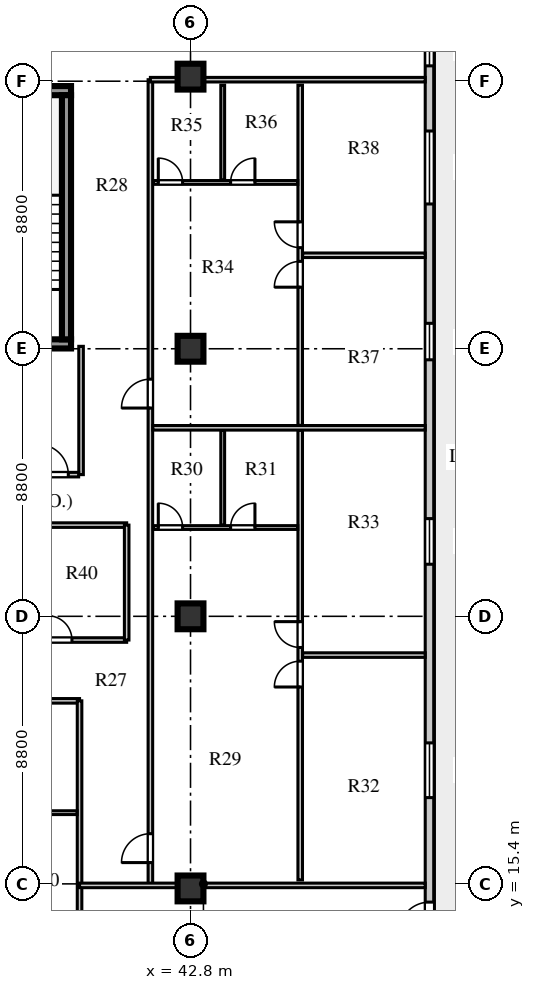
"""IFC4 building model, lengths in metres.
Left out: names, types, materials, properties, quantities, classifications, styles, units other than length and angle.
Written with IfcOpenShell. Run it as: python <this file> out.ifc"""

import sys

from ifc_helpers import new_model, si_unit, direction, frame, frame_2d, origin, origin_2d, place, context, subcontext, project, spatial, rectangle, extrude, element, fill, save


model = new_model("IFC4")
c1 = context("Model", 3, precision=1e-05, world=origin(), true_north=direction((0.0, 1.0)))
c2 = subcontext(c1, "Body", "Model", "MODEL_VIEW")
j1 = project(units=[si_unit("LENGTHUNIT", "METRE"), si_unit("PLANEANGLEUNIT", "RADIAN")], contexts=[c1])
p1 = place(None, origin())
s1 = spatial("IfcSite", under=j1, at=p1, CompositionType="ELEMENT")
p2 = place(p1, origin())
s2 = spatial("IfcBuilding", under=s1, at=p2, CompositionType="ELEMENT")
p3 = place(p2, frame((0.0, 0.0, 245.3)))
s3 = spatial("IfcBuildingStorey", under=s2, at=p3, CompositionType="ELEMENT", Elevation=245.3)
for number, where, z_axis, x_axis in (
    (1, (34.225, 33.16, 0.0), (0.0, 0.0, 1.0), (1.0, 0.0, 0.0)),
    (2, (34.225, 41.49, 0.0), (0.0, 0.0, 1.0), (1.0, 0.0, 0.0)),
):
    element("IfcWall", number, at=place(p3, frame(where, z_axis=z_axis, x_axis=x_axis)), inside=s3, PredefinedType="SHEAR", context=c2, shape_type="SweptSolid", body=[
        extrude(rectangle(XDim=4.645, YDim=0.3, at=frame_2d((2.323, 0.0))), origin(), (0.0, 0.0, 1.0), 3.66),
    ])
p4 = place(p3, frame((38.72, 33.31, 0.0), z_axis=(0.0, 0.0, 1.0), x_axis=(0.0, 1.0, 0.0)))
e3 = element("IfcWall", 3, at=p4, inside=s3, PredefinedType="SHEAR", context=c2, shape_type="SweptSolid", body=[
    extrude(rectangle(XDim=8.03, YDim=0.3, at=frame_2d((4.015, 0.0))), origin(), (0.0, 0.0, 1.0), 3.66),
])
for number, where, z_axis, x_axis in (
    (4, (42.8, 15.25, 0.0), (0.0, 0.0, 1.0), (1.0, 0.0, 0.0)),
    (5, (42.8, 24.2, 0.0), (0.0, 0.0, 1.0), (1.0, 0.0, 0.0)),
    (6, (42.8, 33.0, 0.0), (0.0, 0.0, 1.0), (1.0, 0.0, 0.0)),
    (7, (42.8, 41.95, 0.0), (0.0, 0.0, 1.0), (1.0, 0.0, 0.0)),
):
    element("IfcColumn", number, at=place(p3, frame(where, z_axis=z_axis, x_axis=x_axis)), inside=s3, PredefinedType="COLUMN", context=c2, shape_type="SweptSolid", body=[
        extrude(rectangle(XDim=0.85, YDim=0.85, at=origin_2d()), origin(), (0.0, 0.0, 1.0), 3.66),
    ])
p5 = place(p3, frame((50.66, 13.13, 0.0), z_axis=(0.0, 0.0, 1.0), x_axis=(0.0, 1.0, 0.0)))
e8 = element("IfcWall", 8, at=p5, inside=s3, PredefinedType="STANDARD", context=c2, shape_type="SweptSolid", body=[
    extrude(rectangle(XDim=30.94, YDim=0.28, at=frame_2d((15.47, 0.0))), origin(), (0.0, 0.0, 1.0), 3.66),
])
p6 = place(p5, frame((0.67, 0.0, 0.0)))
e9 = element("IfcOpeningElement", 9, at=p6, cuts=e8, PredefinedType="OPENING", context=c2, shape_type="SweptSolid", body=[
    extrude(rectangle(XDim=1.0, YDim=2.05, at=frame_2d((0.5, 1.025))), frame((0.0, 0.15, 0.0), z_axis=(0.0, -1.0, 0.0), x_axis=(1.0, 0.0, 0.0)), (0.0, 0.0, 1.0), 0.3),
])
p7 = place(p5, frame((5.107, 0.0, 0.8)))
e10 = element("IfcOpeningElement", 10, at=p7, cuts=e8, PredefinedType="OPENING", context=c2, shape_type="SweptSolid", body=[
    extrude(rectangle(XDim=1.8, YDim=2.0, at=frame_2d((0.9, 1.0))), frame((0.0, 0.15, 0.0), z_axis=(0.0, -1.0, 0.0), x_axis=(1.0, 0.0, 0.0)), (0.0, 0.0, 1.0), 0.3),
])
p8 = place(p5, frame((12.783, 0.0, 0.8)))
e11 = element("IfcOpeningElement", 11, at=p8, cuts=e8, PredefinedType="OPENING", context=c2, shape_type="SweptSolid", body=[
    extrude(rectangle(XDim=1.5, YDim=2.0, at=frame_2d((0.75, 1.0))), frame((0.0, 0.15, 0.0), z_axis=(0.0, -1.0, 0.0), x_axis=(1.0, 0.0, 0.0)), (0.0, 0.0, 1.0), 0.3),
])
p9 = place(p5, frame((19.507, 0.0, 0.8)))
e12 = element("IfcOpeningElement", 12, at=p9, cuts=e8, PredefinedType="OPENING", context=c2, shape_type="SweptSolid", body=[
    extrude(rectangle(XDim=1.2, YDim=1.75, at=frame_2d((0.6, 0.875))), frame((0.0, 0.15, 0.0), z_axis=(0.0, -1.0, 0.0), x_axis=(1.0, 0.0, 0.0)), (0.0, 0.0, 1.0), 0.3),
])
p10 = place(p5, frame((24.632, 0.0, 0.8)))
e13 = element("IfcOpeningElement", 13, at=p10, cuts=e8, PredefinedType="OPENING", context=c2, shape_type="SweptSolid", body=[
    extrude(rectangle(XDim=2.4, YDim=2.05, at=frame_2d((1.2, 1.025))), frame((0.0, 0.15, 0.0), z_axis=(0.0, -1.0, 0.0), x_axis=(1.0, 0.0, 0.0)), (0.0, 0.0, 1.0), 0.3),
])
p11 = place(p5, frame((29.175, 0.0, 0.8)))
e14 = element("IfcOpeningElement", 14, at=p11, cuts=e8, PredefinedType="OPENING", context=c2, shape_type="SweptSolid", body=[
    extrude(rectangle(XDim=1.2, YDim=1.75, at=frame_2d((0.6, 0.875))), frame((0.0, 0.15, 0.0), z_axis=(0.0, -1.0, 0.0), x_axis=(1.0, 0.0, 0.0)), (0.0, 0.0, 1.0), 0.3),
])
p12 = place(p3, frame((39.2, 28.86, 0.0), z_axis=(0.0, 0.0, 1.0), x_axis=(0.0, 1.0, 0.0)))
e15 = element("IfcWall", 15, at=p12, inside=s3, PredefinedType="PARTITIONING", context=c2, shape_type="SweptSolid", body=[
    extrude(rectangle(XDim=4.22, YDim=0.15, at=frame_2d((2.11, 0.0))), origin(), (0.0, 0.0, 1.0), 3.66),
])
p13 = place(p3, frame((37.48, 28.86, 0.0), z_axis=(0.0, 0.0, 1.0), x_axis=(1.0, 0.0, 0.0)))
e16 = element("IfcWall", 16, at=p13, inside=s3, PredefinedType="PARTITIONING", context=c2, shape_type="SweptSolid", body=[
    extrude(rectangle(XDim=1.64, YDim=0.15, at=frame_2d((0.82, 0.0))), origin(), (0.0, 0.0, 1.0), 3.66),
])
p14 = place(p13, frame((0.3, 0.0, 0.0)))
e17 = element("IfcOpeningElement", 17, at=p14, cuts=e16, PredefinedType="OPENING", context=c2, shape_type="SweptSolid", body=[
    extrude(rectangle(XDim=1.0, YDim=2.1, at=frame_2d((0.5, 1.05))), frame((0.0, 0.085, 0.0), z_axis=(0.0, -1.0, 0.0), x_axis=(1.0, 0.0, 0.0)), (0.0, 0.0, 1.0), 0.17),
])
p15 = place(p3, frame((27.08, 21.42, 0.0), z_axis=(0.0, 0.0, 1.0), x_axis=(1.0, 0.0, 0.0)))
e18 = element("IfcWall", 18, at=p15, inside=s3, PredefinedType="PARTITIONING", context=c2, shape_type="SweptSolid", body=[
    extrude(rectangle(XDim=12.07, YDim=0.15, at=frame_2d((6.035, 0.0))), origin(), (0.0, 0.0, 1.0), 3.31),
])
p16 = place(p15, frame((0.63, 0.0, 0.0)))
e19 = element("IfcOpeningElement", 19, at=p16, cuts=e18, PredefinedType="OPENING", context=c2, shape_type="SweptSolid", body=[
    extrude(rectangle(XDim=0.95, YDim=2.1, at=frame_2d((0.475, 1.05))), frame((0.0, 0.085, 0.0), z_axis=(0.0, -1.0, 0.0), x_axis=(1.0, 0.0, 0.0)), (0.0, 0.0, 1.0), 0.17),
])
p17 = place(p3, frame((39.15, 7.88, 0.0), z_axis=(0.0, 0.0, 1.0), x_axis=(0.0, 1.0, 0.0)))
e20 = element("IfcWall", 20, at=p17, inside=s3, PredefinedType="PARTITIONING", context=c2, shape_type="SweptSolid", body=[
    extrude(rectangle(XDim=13.54, YDim=0.15, at=frame_2d((6.77, 0.0))), origin(), (0.0, 0.0, 1.0), 3.66),
])
p18 = place(p3, frame((35.85, 17.742, 0.0), z_axis=(0.0, 0.0, 1.0), x_axis=(1.0, 0.0, 0.0)))
e21 = element("IfcWall", 21, at=p18, inside=s3, PredefinedType="PLUMBINGWALL", context=c2, shape_type="SweptSolid", body=[
    extrude(rectangle(XDim=3.22, YDim=0.125, at=frame_2d((1.61, 0.0))), origin(), (0.0, 0.0, 1.0), 3.66),
])
p19 = place(p3, frame((41.48, 15.35, 0.0), z_axis=(0.0, 0.0, 1.0), x_axis=(0.0, 1.0, 0.0)))
e22 = element("IfcWall", 22, at=p19, inside=s3, PredefinedType="PARTITIONING", context=c2, shape_type="SweptSolid", body=[
    extrude(rectangle(XDim=26.5, YDim=0.15, at=frame_2d((13.25, 0.0))), origin(), (0.0, 0.0, 1.0), 3.66),
])
p20 = place(p19, frame((0.75, 0.0, 0.0)))
e23 = element("IfcOpeningElement", 23, at=p20, cuts=e22, PredefinedType="OPENING", context=c2, shape_type="SweptSolid", body=[
    extrude(rectangle(XDim=0.95, YDim=2.1, at=frame_2d((0.475, 1.05))), frame((0.0, 0.085, 0.0), z_axis=(0.0, -1.0, 0.0), x_axis=(1.0, 0.0, 0.0)), (0.0, 0.0, 1.0), 0.17),
])
p21 = place(p19, frame((15.7, 0.0, 0.0)))
e24 = element("IfcOpeningElement", 24, at=p21, cuts=e22, PredefinedType="OPENING", context=c2, shape_type="SweptSolid", body=[
    extrude(rectangle(XDim=0.95, YDim=2.1, at=frame_2d((0.475, 1.05))), frame((0.0, 0.085, 0.0), z_axis=(0.0, -1.0, 0.0), x_axis=(1.0, 0.0, 0.0)), (0.0, 0.0, 1.0), 0.17),
])
p22 = place(p3, frame((39.15, 15.35, 0.0), z_axis=(0.0, 0.0, 1.0), x_axis=(1.0, 0.0, 0.0)))
e25 = element("IfcWall", 25, at=p22, inside=s3, PredefinedType="PARTITIONING", context=c2, shape_type="SweptSolid", body=[
    extrude(rectangle(XDim=11.37, YDim=0.15, at=frame_2d((5.685, 0.0))), origin(), (0.0, 0.0, 1.0), 3.06),
])
p23 = place(p3, frame((41.48, 41.85, 0.0), z_axis=(0.0, 0.0, 1.0), x_axis=(1.0, 0.0, 0.0)))
e26 = element("IfcWall", 26, at=p23, inside=s3, PredefinedType="PARTITIONING", context=c2, shape_type="SweptSolid", body=[
    extrude(rectangle(XDim=9.04, YDim=0.15, at=frame_2d((4.52, 0.0))), origin(), (0.0, 0.0, 1.0), 3.06),
])
p24 = place(p3, frame((46.408, 15.53, 0.0), z_axis=(0.0, 0.0, 1.0), x_axis=(0.0, 1.0, 0.0)))
e27 = element("IfcWall", 27, at=p24, inside=s3, PredefinedType="PARTITIONING", context=c2, shape_type="SweptSolid", body=[
    extrude(rectangle(XDim=14.79, YDim=0.15, at=frame_2d((7.395, 0.0))), origin(), (0.0, 0.0, 1.0), 3.66),
])
p25 = place(p24, frame((6.345, 0.0, 0.0)))
e28 = element("IfcOpeningElement", 28, at=p25, cuts=e27, PredefinedType="OPENING", context=c2, shape_type="SweptSolid", body=[
    extrude(rectangle(XDim=0.85, YDim=2.08, at=frame_2d((0.425, 1.04))), frame((0.0, 0.085, 0.0), z_axis=(0.0, -1.0, 0.0), x_axis=(1.0, 0.0, 0.0)), (0.0, 0.0, 1.0), 0.17),
])
p26 = place(p24, frame((7.645, 0.0, 0.0)))
e29 = element("IfcOpeningElement", 29, at=p26, cuts=e27, PredefinedType="OPENING", context=c2, shape_type="SweptSolid", body=[
    extrude(rectangle(XDim=0.85, YDim=2.08, at=frame_2d((0.425, 1.04))), frame((0.0, 0.085, 0.0), z_axis=(0.0, -1.0, 0.0), x_axis=(1.0, 0.0, 0.0)), (0.0, 0.0, 1.0), 0.17),
])
p27 = place(p3, frame((41.58, 27.12, 0.0), z_axis=(0.0, 0.0, 1.0), x_axis=(1.0, 0.0, 0.0)))
e30 = element("IfcWall", 30, at=p27, inside=s3, PredefinedType="PLUMBINGWALL", context=c2, shape_type="SweptSolid", body=[
    extrude(rectangle(XDim=4.748, YDim=0.125, at=frame_2d((2.374, 0.0))), origin(), (0.0, 0.0, 1.0), 3.31),
])
p28 = place(p27, frame((0.16, 0.0, 0.0)))
e31 = element("IfcOpeningElement", 31, at=p28, cuts=e30, PredefinedType="OPENING", context=c2, shape_type="SweptSolid", body=[
    extrude(rectangle(XDim=0.8, YDim=2.05, at=frame_2d((0.4, 1.025))), frame((0.0, 0.073, 0.0), z_axis=(0.0, -1.0, 0.0), x_axis=(1.0, 0.0, 0.0)), (0.0, 0.0, 1.0), 0.145),
])
p29 = place(p27, frame((2.539, 0.0, 0.0)))
e32 = element("IfcOpeningElement", 32, at=p29, cuts=e30, PredefinedType="OPENING", context=c2, shape_type="SweptSolid", body=[
    extrude(rectangle(XDim=0.8, YDim=2.05, at=frame_2d((0.4, 1.025))), frame((0.0, 0.073, 0.0), z_axis=(0.0, -1.0, 0.0), x_axis=(1.0, 0.0, 0.0)), (0.0, 0.0, 1.0), 0.145),
])
p30 = place(p3, frame((43.859, 27.2, 0.0), z_axis=(0.0, 0.0, 1.0), x_axis=(0.0, 1.0, 0.0)))
e33 = element("IfcWall", 33, at=p30, inside=s3, PredefinedType="PLUMBINGWALL", context=c2, shape_type="SweptSolid", body=[
    extrude(rectangle(XDim=3.12, YDim=0.125, at=frame_2d((1.56, 0.0))), origin(), (0.0, 0.0, 1.0), 3.66),
])
p31 = place(p3, frame((46.488, 22.925, 0.0), z_axis=(0.0, 0.0, 1.0), x_axis=(1.0, 0.0, 0.0)))
e34 = element("IfcWall", 34, at=p31, inside=s3, PredefinedType="PARTITIONING", context=c2, shape_type="SweptSolid", body=[
    extrude(rectangle(XDim=4.032, YDim=0.15, at=frame_2d((2.016, 0.0))), origin(), (0.0, 0.0, 1.0), 3.66),
])
p32 = place(p3, frame((41.56, 30.4, 0.0), z_axis=(0.0, 0.0, 1.0), x_axis=(1.0, 0.0, 0.0)))
e35 = element("IfcWall", 35, at=p32, inside=s3, PredefinedType="PARTITIONING", context=c2, shape_type="SweptSolid", body=[
    extrude(rectangle(XDim=8.96, YDim=0.15, at=frame_2d((4.48, 0.0))), origin(), (0.0, 0.0, 1.0), 3.66),
])
p33 = place(p3, frame((46.408, 30.48, 0.0), z_axis=(0.0, 0.0, 1.0), x_axis=(0.0, 1.0, 0.0)))
e36 = element("IfcWall", 36, at=p33, inside=s3, PredefinedType="PARTITIONING", context=c2, shape_type="SweptSolid", body=[
    extrude(rectangle(XDim=11.19, YDim=0.15, at=frame_2d((5.595, 0.0))), origin(), (0.0, 0.0, 1.0), 3.66),
])
p34 = place(p33, frame((4.545, 0.0, 0.0)))
e37 = element("IfcOpeningElement", 37, at=p34, cuts=e36, PredefinedType="OPENING", context=c2, shape_type="SweptSolid", body=[
    extrude(rectangle(XDim=0.85, YDim=2.08, at=frame_2d((0.425, 1.04))), frame((0.0, 0.085, 0.0), z_axis=(0.0, -1.0, 0.0), x_axis=(1.0, 0.0, 0.0)), (0.0, 0.0, 1.0), 0.17),
])
p35 = place(p33, frame((5.845, 0.0, 0.0)))
e38 = element("IfcOpeningElement", 38, at=p35, cuts=e36, PredefinedType="OPENING", context=c2, shape_type="SweptSolid", body=[
    extrude(rectangle(XDim=0.85, YDim=2.08, at=frame_2d((0.425, 1.04))), frame((0.0, 0.085, 0.0), z_axis=(0.0, -1.0, 0.0), x_axis=(1.0, 0.0, 0.0)), (0.0, 0.0, 1.0), 0.17),
])
p36 = place(p3, frame((41.58, 38.47, 0.0), z_axis=(0.0, 0.0, 1.0), x_axis=(1.0, 0.0, 0.0)))
e39 = element("IfcWall", 39, at=p36, inside=s3, PredefinedType="PLUMBINGWALL", context=c2, shape_type="SweptSolid", body=[
    extrude(rectangle(XDim=4.748, YDim=0.125, at=frame_2d((2.374, 0.0))), origin(), (0.0, 0.0, 1.0), 3.66),
])
p37 = place(p36, frame((0.16, 0.0, 0.0)))
e40 = element("IfcOpeningElement", 40, at=p37, cuts=e39, PredefinedType="OPENING", context=c2, shape_type="SweptSolid", body=[
    extrude(rectangle(XDim=0.8, YDim=2.05, at=frame_2d((0.4, 1.025))), frame((0.0, 0.073, 0.0), z_axis=(0.0, -1.0, 0.0), x_axis=(1.0, 0.0, 0.0)), (0.0, 0.0, 1.0), 0.145),
])
p38 = place(p36, frame((2.539, 0.0, 0.0)))
e41 = element("IfcOpeningElement", 41, at=p38, cuts=e39, PredefinedType="OPENING", context=c2, shape_type="SweptSolid", body=[
    extrude(rectangle(XDim=0.8, YDim=2.05, at=frame_2d((0.4, 1.025))), frame((0.0, 0.073, 0.0), z_axis=(0.0, -1.0, 0.0), x_axis=(1.0, 0.0, 0.0)), (0.0, 0.0, 1.0), 0.145),
])
p39 = place(p3, frame((43.859, 38.55, 0.0), z_axis=(0.0, 0.0, 1.0), x_axis=(0.0, 1.0, 0.0)))
e42 = element("IfcWall", 42, at=p39, inside=s3, PredefinedType="PLUMBINGWALL", context=c2, shape_type="SweptSolid", body=[
    extrude(rectangle(XDim=3.12, YDim=0.125, at=frame_2d((1.56, 0.0))), origin(), (0.0, 0.0, 1.0), 3.66),
])
p40 = place(p3, frame((46.488, 36.075, 0.0), z_axis=(0.0, 0.0, 1.0), x_axis=(1.0, 0.0, 0.0)))
e43 = element("IfcWall", 43, at=p40, inside=s3, PredefinedType="PARTITIONING", context=c2, shape_type="SweptSolid", body=[
    extrude(rectangle(XDim=4.032, YDim=0.15, at=frame_2d((2.016, 0.0))), origin(), (0.0, 0.0, 1.0), 3.66),
])
p41 = place(p3, frame((34.8, 23.42, 0.0), z_axis=(0.0, 0.0, 1.0), x_axis=(1.0, 0.0, 0.0)))
e44 = element("IfcWall", 44, at=p41, inside=s3, PredefinedType="PARTITIONING", context=c2, shape_type="SweptSolid", body=[
    extrude(rectangle(XDim=5.9, YDim=0.15, at=frame_2d((2.95, 0.0))), origin(), (0.0, 0.0, 1.0), 3.66),
])
p42 = place(p41, frame((0.43, 0.0, 0.0)))
e45 = element("IfcOpeningElement", 45, at=p42, cuts=e44, PredefinedType="OPENING", context=c2, shape_type="SweptSolid", body=[
    extrude(rectangle(XDim=0.8, YDim=2.05, at=frame_2d((0.4, 1.025))), frame((0.0, 0.085, 0.0), z_axis=(0.0, -1.0, 0.0), x_axis=(1.0, 0.0, 0.0)), (0.0, 0.0, 1.0), 0.17),
])
p43 = place(p41, frame((3.3, 0.0, 0.0)))
e46 = element("IfcOpeningElement", 46, at=p43, cuts=e44, PredefinedType="OPENING", context=c2, shape_type="SweptSolid", body=[
    extrude(rectangle(XDim=0.8, YDim=2.05, at=frame_2d((0.4, 1.025))), frame((0.0, 0.085, 0.0), z_axis=(0.0, -1.0, 0.0), x_axis=(1.0, 0.0, 0.0)), (0.0, 0.0, 1.0), 0.17),
])
p44 = place(p3, frame((34.8, 27.2, 0.0), z_axis=(0.0, 0.0, 1.0), x_axis=(1.0, 0.0, 0.0)))
e47 = element("IfcWall", 47, at=p44, inside=s3, PredefinedType="PARTITIONING", context=c2, shape_type="SweptSolid", body=[
    extrude(rectangle(XDim=5.9, YDim=0.15, at=frame_2d((2.95, 0.0))), origin(), (0.0, 0.0, 1.0), 3.31),
])
p45 = place(p3, frame((40.7, 23.42, 0.0), z_axis=(0.0, 0.0, 1.0), x_axis=(0.0, 1.0, 0.0)))
e48 = element("IfcWall", 48, at=p45, inside=s3, PredefinedType="PARTITIONING", context=c2, shape_type="SweptSolid", body=[
    extrude(rectangle(XDim=3.78, YDim=0.15, at=frame_2d((1.89, 0.0))), origin(), (0.0, 0.0, 1.0), 3.66),
])
p46 = place(p6, frame((1.0, 0.0, 0.0), z_axis=(0.0, 0.0, 1.0), x_axis=(-1.0, 0.0, 0.0)))
e49 = element("IfcDoor", 49, at=p46, inside=s3, OperationType="SINGLE_SWING_RIGHT", PredefinedType="DOOR", context=c2, shape_type="SweptSolid", body=[
    extrude(rectangle(XDim=1.0, YDim=2.05, at=frame_2d((0.5, 1.025))), frame((0.0, 0.025, 0.0), z_axis=(0.0, -1.0, 0.0), x_axis=(1.0, 0.0, 0.0)), (0.0, 0.0, 1.0), 0.05),
])
fill(e9, e49)
p47 = place(p7, origin())
e50 = element("IfcWindow", 50, at=p47, inside=s3, PartitioningType="SINGLE_PANEL", PredefinedType="WINDOW", context=c2, shape_type="SweptSolid", body=[
    extrude(rectangle(XDim=1.8, YDim=2.0, at=frame_2d((0.9, 1.0))), frame((0.0, 0.03, 0.0), z_axis=(0.0, -1.0, 0.0), x_axis=(1.0, 0.0, 0.0)), (0.0, 0.0, 1.0), 0.06),
])
fill(e10, e50)
p48 = place(p8, origin())
e51 = element("IfcWindow", 51, at=p48, inside=s3, PartitioningType="SINGLE_PANEL", PredefinedType="WINDOW", context=c2, shape_type="SweptSolid", body=[
    extrude(rectangle(XDim=1.5, YDim=2.0, at=frame_2d((0.75, 1.0))), frame((0.0, 0.03, 0.0), z_axis=(0.0, -1.0, 0.0), x_axis=(1.0, 0.0, 0.0)), (0.0, 0.0, 1.0), 0.06),
])
fill(e11, e51)
p49 = place(p9, origin())
e52 = element("IfcWindow", 52, at=p49, inside=s3, PartitioningType="SINGLE_PANEL", PredefinedType="WINDOW", context=c2, shape_type="SweptSolid", body=[
    extrude(rectangle(XDim=1.2, YDim=1.75, at=frame_2d((0.6, 0.875))), frame((0.0, 0.03, 0.0), z_axis=(0.0, -1.0, 0.0), x_axis=(1.0, 0.0, 0.0)), (0.0, 0.0, 1.0), 0.06),
])
fill(e12, e52)
p50 = place(p10, origin())
e53 = element("IfcWindow", 53, at=p50, inside=s3, PartitioningType="SINGLE_PANEL", PredefinedType="WINDOW", context=c2, shape_type="SweptSolid", body=[
    extrude(rectangle(XDim=2.4, YDim=2.05, at=frame_2d((1.2, 1.025))), frame((0.0, 0.03, 0.0), z_axis=(0.0, -1.0, 0.0), x_axis=(1.0, 0.0, 0.0)), (0.0, 0.0, 1.0), 0.06),
])
fill(e13, e53)
p51 = place(p11, origin())
e54 = element("IfcWindow", 54, at=p51, inside=s3, PartitioningType="SINGLE_PANEL", PredefinedType="WINDOW", context=c2, shape_type="SweptSolid", body=[
    extrude(rectangle(XDim=1.2, YDim=1.75, at=frame_2d((0.6, 0.875))), frame((0.0, 0.03, 0.0), z_axis=(0.0, -1.0, 0.0), x_axis=(1.0, 0.0, 0.0)), (0.0, 0.0, 1.0), 0.06),
])
fill(e14, e54)
p52 = place(p14, origin())
e55 = element("IfcDoor", 55, at=p52, inside=s3, OperationType="SINGLE_SWING_LEFT", PredefinedType="DOOR", context=c2, shape_type="SweptSolid", body=[
    extrude(rectangle(XDim=1.0, YDim=2.1, at=frame_2d((0.5, 1.05))), frame((0.0, 0.025, 0.0), z_axis=(0.0, -1.0, 0.0), x_axis=(1.0, 0.0, 0.0)), (0.0, 0.0, 1.0), 0.05),
])
fill(e17, e55)
p53 = place(p28, origin())
e56 = element("IfcDoor", 56, at=p53, inside=s3, OperationType="SINGLE_SWING_LEFT", PredefinedType="DOOR", context=c2, shape_type="SweptSolid", body=[
    extrude(rectangle(XDim=0.8, YDim=2.05, at=frame_2d((0.4, 1.025))), frame((0.0, 0.025, 0.0), z_axis=(0.0, -1.0, 0.0), x_axis=(1.0, 0.0, 0.0)), (0.0, 0.0, 1.0), 0.05),
])
fill(e31, e56)
p54 = place(p29, origin())
e57 = element("IfcDoor", 57, at=p54, inside=s3, OperationType="SINGLE_SWING_RIGHT", PredefinedType="DOOR", context=c2, shape_type="SweptSolid", body=[
    extrude(rectangle(XDim=0.8, YDim=2.05, at=frame_2d((0.4, 1.025))), frame((0.0, 0.025, 0.0), z_axis=(0.0, -1.0, 0.0), x_axis=(1.0, 0.0, 0.0)), (0.0, 0.0, 1.0), 0.05),
])
fill(e32, e57)
p55 = place(p25, origin())
e58 = element("IfcDoor", 58, at=p55, inside=s3, OperationType="SINGLE_SWING_LEFT", PredefinedType="DOOR", context=c2, shape_type="SweptSolid", body=[
    extrude(rectangle(XDim=0.85, YDim=2.08, at=frame_2d((0.425, 1.04))), frame((0.0, 0.025, 0.0), z_axis=(0.0, -1.0, 0.0), x_axis=(1.0, 0.0, 0.0)), (0.0, 0.0, 1.0), 0.05),
])
fill(e28, e58)
p56 = place(p26, origin())
e59 = element("IfcDoor", 59, at=p56, inside=s3, OperationType="SINGLE_SWING_RIGHT", PredefinedType="DOOR", context=c2, shape_type="SweptSolid", body=[
    extrude(rectangle(XDim=0.85, YDim=2.08, at=frame_2d((0.425, 1.04))), frame((0.0, 0.025, 0.0), z_axis=(0.0, -1.0, 0.0), x_axis=(1.0, 0.0, 0.0)), (0.0, 0.0, 1.0), 0.05),
])
fill(e29, e59)
p57 = place(p20, origin())
e60 = element("IfcDoor", 60, at=p57, inside=s3, OperationType="SINGLE_SWING_LEFT", PredefinedType="DOOR", context=c2, shape_type="SweptSolid", body=[
    extrude(rectangle(XDim=0.95, YDim=2.1, at=frame_2d((0.475, 1.05))), frame((0.0, 0.025, 0.0), z_axis=(0.0, -1.0, 0.0), x_axis=(1.0, 0.0, 0.0)), (0.0, 0.0, 1.0), 0.05),
])
fill(e23, e60)
p58 = place(p37, origin())
e61 = element("IfcDoor", 61, at=p58, inside=s3, OperationType="SINGLE_SWING_LEFT", PredefinedType="DOOR", context=c2, shape_type="SweptSolid", body=[
    extrude(rectangle(XDim=0.8, YDim=2.05, at=frame_2d((0.4, 1.025))), frame((0.0, 0.025, 0.0), z_axis=(0.0, -1.0, 0.0), x_axis=(1.0, 0.0, 0.0)), (0.0, 0.0, 1.0), 0.05),
])
fill(e40, e61)
p59 = place(p38, origin())
e62 = element("IfcDoor", 62, at=p59, inside=s3, OperationType="SINGLE_SWING_RIGHT", PredefinedType="DOOR", context=c2, shape_type="SweptSolid", body=[
    extrude(rectangle(XDim=0.8, YDim=2.05, at=frame_2d((0.4, 1.025))), frame((0.0, 0.025, 0.0), z_axis=(0.0, -1.0, 0.0), x_axis=(1.0, 0.0, 0.0)), (0.0, 0.0, 1.0), 0.05),
])
fill(e41, e62)
p60 = place(p34, origin())
e63 = element("IfcDoor", 63, at=p60, inside=s3, OperationType="SINGLE_SWING_LEFT", PredefinedType="DOOR", context=c2, shape_type="SweptSolid", body=[
    extrude(rectangle(XDim=0.85, YDim=2.08, at=frame_2d((0.425, 1.04))), frame((0.0, 0.025, 0.0), z_axis=(0.0, -1.0, 0.0), x_axis=(1.0, 0.0, 0.0)), (0.0, 0.0, 1.0), 0.05),
])
fill(e37, e63)
p61 = place(p35, origin())
e64 = element("IfcDoor", 64, at=p61, inside=s3, OperationType="SINGLE_SWING_RIGHT", PredefinedType="DOOR", context=c2, shape_type="SweptSolid", body=[
    extrude(rectangle(XDim=0.85, YDim=2.08, at=frame_2d((0.425, 1.04))), frame((0.0, 0.025, 0.0), z_axis=(0.0, -1.0, 0.0), x_axis=(1.0, 0.0, 0.0)), (0.0, 0.0, 1.0), 0.05),
])
fill(e38, e64)
p62 = place(p21, origin())
e65 = element("IfcDoor", 65, at=p62, inside=s3, OperationType="SINGLE_SWING_LEFT", PredefinedType="DOOR", context=c2, shape_type="SweptSolid", body=[
    extrude(rectangle(XDim=0.95, YDim=2.1, at=frame_2d((0.475, 1.05))), frame((0.0, 0.025, 0.0), z_axis=(0.0, -1.0, 0.0), x_axis=(1.0, 0.0, 0.0)), (0.0, 0.0, 1.0), 0.05),
])
fill(e24, e65)
p63 = place(p43, origin())
e66 = element("IfcDoor", 66, at=p63, inside=s3, OperationType="SINGLE_SWING_LEFT", PredefinedType="DOOR", context=c2, shape_type="SweptSolid", body=[
    extrude(rectangle(XDim=0.8, YDim=2.05, at=frame_2d((0.4, 1.025))), frame((0.0, 0.025, 0.0), z_axis=(0.0, -1.0, 0.0), x_axis=(1.0, 0.0, 0.0)), (0.0, 0.0, 1.0), 0.05),
])
fill(e46, e66)
save(model, sys.argv[1])
